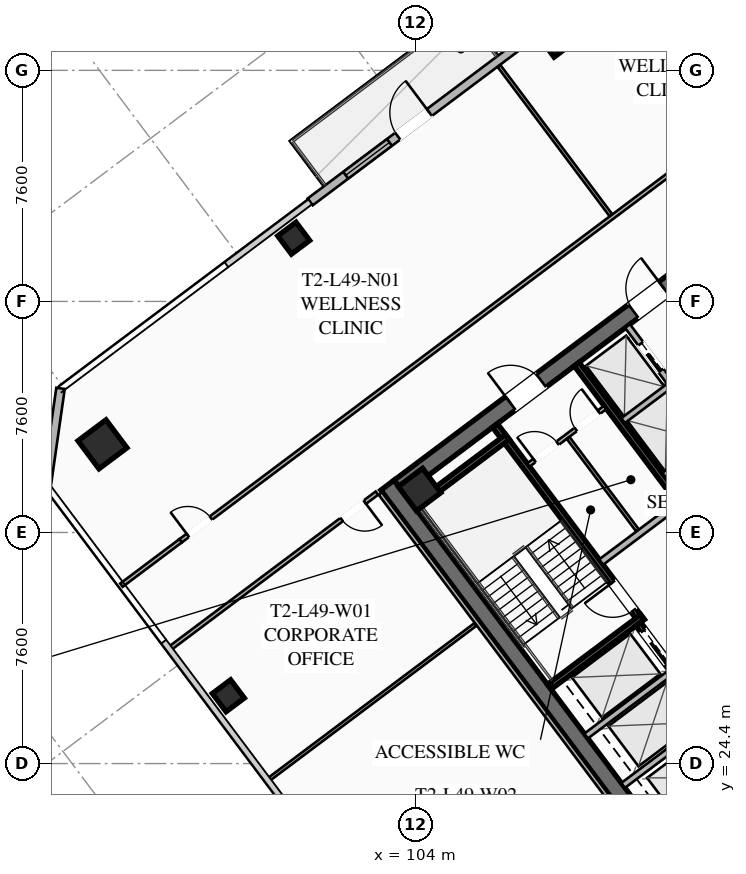
"""IFC4 building model, lengths in metres.
Left out: names, types, materials, properties, quantities, classifications, styles, units other than length and angle.
Written with IfcOpenShell. Run it as: python <this file> out.ifc"""

import sys

from ifc_helpers import new_model, si_unit, direction, frame, frame_2d, origin, origin_2d, place, context, subcontext, project, spatial, rectangle, hollow_rectangle, extrude, element, fill, save


model = new_model("IFC4")
c1 = context("Model", 3, precision=1e-05, world=origin(), true_north=direction((0.0, 1.0)))
c2 = subcontext(c1, "Body", "Model", "MODEL_VIEW")
j1 = project(units=[si_unit("LENGTHUNIT", "METRE"), si_unit("PLANEANGLEUNIT", "RADIAN")], contexts=[c1])
p1 = place(None, origin())
s1 = spatial("IfcSite", under=j1, at=p1, CompositionType="ELEMENT")
p2 = place(p1, origin())
s2 = spatial("IfcBuilding", under=s1, at=p2, CompositionType="ELEMENT")
p3 = place(p2, frame((0.0, 0.0, 181.85)))
s3 = spatial("IfcBuildingStorey", under=s2, at=p3, CompositionType="ELEMENT", Elevation=181.85)
p4 = place(p3, frame((112.436, 21.077, 0.0), z_axis=(0.0, 0.0, 1.0), x_axis=(-0.600005007985, 0.799996243986, 0.0)))
e1 = element("IfcWall", 1, at=p4, inside=s3, PredefinedType="SHEAR", context=c2, shape_type="SweptSolid", body=[
    extrude(rectangle(XDim=15.6, YDim=0.55, at=frame_2d((7.8, 0.0))), origin(), (0.0, 0.0, 1.0), 3.55),
])
p5 = place(p3, frame((103.461, 33.502, 0.0), z_axis=(0.0, 0.0, 1.0), x_axis=(0.799998054672, 0.600002593761, 0.0)))
e2 = element("IfcWall", 2, at=p5, inside=s3, PredefinedType="SHEAR", context=c2, shape_type="SweptSolid", body=[
    extrude(rectangle(XDim=15.06, YDim=0.55, at=frame_2d((7.53, 0.0))), origin(), (0.0, 0.0, 1.0), 3.55),
])
p6 = place(p5, frame((4.58, 0.0, 0.0)))
e3 = element("IfcOpeningElement", 3, at=p6, cuts=e2, PredefinedType="OPENING", context=c2, shape_type="SweptSolid", body=[
    extrude(rectangle(XDim=1.25, YDim=2.25, at=frame_2d((0.625, 1.125))), frame((0.0, 0.285, 0.0), z_axis=(0.0, -1.0, 0.0), x_axis=(1.0, 0.0, 0.0)), (0.0, 0.0, 1.0), 0.57),
])
p7 = place(p5, frame((9.63, 0.0, 0.0)))
e4 = element("IfcOpeningElement", 4, at=p7, cuts=e2, PredefinedType="OPENING", context=c2, shape_type="SweptSolid", body=[
    extrude(rectangle(XDim=1.25, YDim=2.25, at=frame_2d((0.625, 1.125))), frame((0.0, 0.285, 0.0), z_axis=(0.0, -1.0, 0.0), x_axis=(1.0, 0.0, 0.0)), (0.0, 0.0, 1.0), 0.57),
])
p8 = place(p3, frame((104.13, 33.41, 0.0), z_axis=(0.0, 0.0, 1.0), x_axis=(0.799999996291, 0.600000004945, 0.0)))
e5 = element("IfcColumn", 5, at=p8, inside=s3, PredefinedType="COLUMN", context=c2, shape_type="SweptSolid", body=[
    extrude(hollow_rectangle(XDim=1.0, YDim=1.0, WallThickness=0.04, at=origin_2d()), origin(), (0.0, 0.0, 1.0), 3.37),
])
p9 = place(p3, frame((93.7, 34.9, 0.0), z_axis=(0.0, 0.0, 1.0), x_axis=(0.799999996291, 0.600000004945, 0.0)))
e6 = element("IfcColumn", 6, at=p9, inside=s3, PredefinedType="COLUMN", context=c2, shape_type="SweptSolid", body=[
    extrude(hollow_rectangle(XDim=1.15, YDim=1.15, WallThickness=0.045, at=origin_2d()), origin(), (0.0, 0.0, 1.0), 3.37),
])
for number, where, z_axis, x_axis in (
    (7, (108.63, 48.16, 0.0), (0.0, 0.0, 1.0), (0.8, 0.6, 0.0)),
    (8, (99.99, 41.68, 0.0), (0.0, 0.0, 1.0), (0.8, 0.6, 0.0)),
    (9, (97.84, 26.63, 0.0), (0.0, 0.0, 1.0), (0.8, 0.6, 0.0)),
):
    element("IfcColumn", number, at=place(p3, frame(where, z_axis=z_axis, x_axis=x_axis)), inside=s3, PredefinedType="COLUMN", context=c2, shape_type="SweptSolid", body=[
        extrude(hollow_rectangle(XDim=0.75, YDim=0.75, WallThickness=0.032, at=origin_2d()), origin(), (0.0, 0.0, 1.0), 3.37),
    ])
p10 = place(p3, frame((100.532, 42.874, 0.0), z_axis=(0.0, 0.0, 1.0), x_axis=(0.799996553335, 0.600004595526, 0.0)))
e10 = element("IfcWall", 10, at=p10, inside=s3, PredefinedType="SOLIDWALL", context=c2, shape_type="SweptSolid", body=[
    extrude(rectangle(XDim=8.5, YDim=0.28, at=frame_2d((4.25, 0.0))), origin(), (0.0, 0.0, 1.0), 3.37),
])
p11 = place(p10, frame((3.6, 0.0, 0.0)))
e11 = element("IfcOpeningElement", 11, at=p11, cuts=e10, PredefinedType="OPENING", context=c2, shape_type="SweptSolid", body=[
    extrude(rectangle(XDim=1.3, YDim=2.15, at=frame_2d((0.65, 1.075))), frame((0.0, 0.15, 0.0), z_axis=(0.0, -1.0, 0.0), x_axis=(1.0, 0.0, 0.0)), (0.0, 0.0, 1.0), 0.3),
])
p12 = place(p10, frame((1.46, 0.0, 0.85)))
e12 = element("IfcOpeningElement", 12, at=p12, cuts=e10, PredefinedType="OPENING", context=c2, shape_type="SweptSolid", body=[
    extrude(rectangle(XDim=1.8, YDim=1.92, at=frame_2d((0.9, 0.96))), frame((0.0, 0.15, 0.0), z_axis=(0.0, -1.0, 0.0), x_axis=(1.0, 0.0, 0.0)), (0.0, 0.0, 1.0), 0.3),
])
p13 = place(p3, frame((91.86, 33.52, 0.0), z_axis=(0.0, 0.0, 1.0), x_axis=(0.141410847992, 0.989950994782, 0.0)))
e13 = element("IfcWall", 13, at=p13, inside=s3, PredefinedType="SOLIDWALL", context=c2, shape_type="SweptSolid", body=[
    extrude(rectangle(XDim=3.253, YDim=0.28, at=frame_2d((1.626, 0.0))), origin(), (0.0, 0.0, 1.0), 3.37),
])
p14 = place(p3, frame((111.44, 29.08, 0.0), z_axis=(0.0, 0.0, 1.0), x_axis=(-0.59999029481, 0.8000072788, 0.0)))
e14 = element("IfcWall", 14, at=p14, inside=s3, PredefinedType="SHEAR", context=c2, shape_type="SweptSolid", body=[
    extrude(rectangle(XDim=8.05, YDim=0.2, at=frame_2d((4.025, 0.0))), origin(), (0.0, 0.0, 1.0), 3.37),
])
p15 = place(p14, frame((0.45, 0.0, 0.0)))
e15 = element("IfcOpeningElement", 15, at=p15, cuts=e14, PredefinedType="OPENING", context=c2, shape_type="SweptSolid", body=[
    extrude(rectangle(XDim=1.15, YDim=2.2, at=frame_2d((0.575, 1.1))), frame((0.0, 0.11, 0.0), z_axis=(0.0, -1.0, 0.0), x_axis=(1.0, 0.0, 0.0)), (0.0, 0.0, 1.0), 0.22),
])
for number, where, z_axis, x_axis in (
    (16, (108.396, 26.922, 0.0), (0.0, 0.0, 1.0), (0.8, 0.6, 0.0)),
    (17, (103.956, 32.842, 0.0), (0.0, 0.0, 1.0), (0.8, 0.6, 0.0)),
):
    element("IfcWall", number, at=place(p3, frame(where, z_axis=z_axis, x_axis=x_axis)), inside=s3, PredefinedType="SHEAR", context=c2, shape_type="SweptSolid", body=[
        extrude(rectangle(XDim=3.83, YDim=0.2, at=frame_2d((1.915, 0.0))), origin(), (0.0, 0.0, 1.0), 3.37),
    ])
p16 = place(p3, frame((117.998, 25.936, 0.0), z_axis=(0.0, 0.0, 1.0), x_axis=(-0.600002693989, 0.799997979501, 0.0)))
e18 = element("IfcWall", 18, at=p16, inside=s3, PredefinedType="SHEAR", context=c2, shape_type="SweptSolid", body=[
    extrude(rectangle(XDim=14.5, YDim=0.2, at=frame_2d((7.25, 0.0))), origin(), (0.0, 0.0, 1.0), 3.37),
])
p17 = place(p3, frame((110.104, 31.028, 0.0), z_axis=(0.0, 0.0, 1.0), x_axis=(0.800018601094, 0.59997519774, 0.0)))
e19 = element("IfcWall", 19, at=p17, inside=s3, PredefinedType="SOLIDWALL", context=c2, shape_type="SweptSolid", body=[
    extrude(rectangle(XDim=3.15, YDim=0.22, at=frame_2d((1.575, 0.0))), origin(), (0.0, 0.0, 1.0), 2.723),
])
p18 = place(p3, frame((115.19, 23.83, 0.0), z_axis=(0.0, 0.0, 1.0), x_axis=(-0.599993943644, 0.800004542231, 0.0)))
e20 = element("IfcWall", 20, at=p18, inside=s3, PredefinedType="SHEAR", context=c2, shape_type="SweptSolid", body=[
    extrude(rectangle(XDim=6.45, YDim=0.2, at=frame_2d((3.225, 0.0))), origin(), (0.0, 0.0, 1.0), 3.37),
])
p19 = place(p18, frame((4.875, 0.0, 0.0)))
e21 = element("IfcOpeningElement", 21, at=p19, cuts=e20, PredefinedType="OPENING", context=c2, shape_type="SweptSolid", body=[
    extrude(rectangle(XDim=1.3, YDim=2.25, at=frame_2d((0.65, 1.125))), frame((0.0, 0.11, 0.0), z_axis=(0.0, -1.0, 0.0), x_axis=(1.0, 0.0, 0.0)), (0.0, 0.0, 1.0), 0.22),
])
p20 = place(p18, frame((2.875, 0.0, 0.0)))
e22 = element("IfcOpeningElement", 22, at=p20, cuts=e20, PredefinedType="OPENING", context=c2, shape_type="SweptSolid", body=[
    extrude(rectangle(XDim=1.3, YDim=2.25, at=frame_2d((0.65, 1.125))), frame((0.0, 0.11, 0.0), z_axis=(0.0, -1.0, 0.0), x_axis=(1.0, 0.0, 0.0)), (0.0, 0.0, 1.0), 0.22),
])
p21 = place(p18, frame((0.675, 0.0, 0.0)))
e23 = element("IfcOpeningElement", 23, at=p21, cuts=e20, PredefinedType="OPENING", context=c2, shape_type="SweptSolid", body=[
    extrude(rectangle(XDim=1.3, YDim=2.25, at=frame_2d((0.65, 1.125))), frame((0.0, 0.11, 0.0), z_axis=(0.0, -1.0, 0.0), x_axis=(1.0, 0.0, 0.0)), (0.0, 0.0, 1.0), 0.22),
])
for number, where, z_axis, x_axis in (
    (24, (110.826, 23.682, 0.0), (0.0, 0.0, 1.0), (0.8, 0.6, 0.0)),
    (25, (109.608, 25.306, 0.0), (0.0, 0.0, 1.0), (0.8, 0.6, 0.0)),
):
    element("IfcWall", number, at=place(p3, frame(where, z_axis=z_axis, x_axis=x_axis)), inside=s3, PredefinedType="SOLIDWALL", context=c2, shape_type="SweptSolid", body=[
        extrude(rectangle(XDim=3.48, YDim=0.2, at=frame_2d((1.74, 0.0))), origin(), (0.0, 0.0, 1.0), 3.37),
    ])
p22 = place(p3, frame((107.71, 34.22, 0.0), z_axis=(0.0, 0.0, 1.0), x_axis=(0.799981399002, 0.60002480053, 0.0)))
e26 = element("IfcWall", 26, at=p22, inside=s3, PredefinedType="PARTITIONING", context=c2, shape_type="SweptSolid", body=[
    extrude(rectangle(XDim=3.15, YDim=0.135, at=frame_2d((1.575, 0.0))), origin(), (0.0, 0.0, 1.0), 2.723),
])
p23 = place(p22, frame((0.25, 0.0, 0.0)))
e27 = element("IfcOpeningElement", 27, at=p23, cuts=e26, PredefinedType="OPENING", context=c2, shape_type="SweptSolid", body=[
    extrude(rectangle(XDim=0.95, YDim=2.05, at=frame_2d((0.475, 1.025))), frame((0.0, 0.077, 0.0), z_axis=(0.0, -1.0, 0.0), x_axis=(1.0, 0.0, 0.0)), (0.0, 0.0, 1.0), 0.155),
])
p24 = place(p22, frame((1.95, 0.0, 0.0)))
e28 = element("IfcOpeningElement", 28, at=p24, cuts=e26, PredefinedType="OPENING", context=c2, shape_type="SweptSolid", body=[
    extrude(rectangle(XDim=0.95, YDim=2.05, at=frame_2d((0.475, 1.025))), frame((0.0, 0.077, 0.0), z_axis=(0.0, -1.0, 0.0), x_axis=(1.0, 0.0, 0.0)), (0.0, 0.0, 1.0), 0.155),
])
p25 = place(p3, frame((111.296, 32.072, 0.0), z_axis=(0.0, 0.0, 1.0), x_axis=(-0.59995887973, 0.800030838552, 0.0)))
e29 = element("IfcWall", 29, at=p25, inside=s3, PredefinedType="PARTITIONING", context=c2, shape_type="SweptSolid", body=[
    extrude(rectangle(XDim=3.8, YDim=0.11, at=frame_2d((1.9, 0.0))), origin(), (0.0, 0.0, 1.0), 2.723),
])
p26 = place(p3, frame((115.11, 33.27, 0.0), z_axis=(0.0, 0.0, 1.0), x_axis=(-0.600011322243, 0.799991508192, 0.0)))
e30 = element("IfcWall", 30, at=p26, inside=s3, PredefinedType="SOLIDWALL", context=c2, shape_type="SweptSolid", body=[
    extrude(rectangle(XDim=6.9, YDim=0.2, at=frame_2d((3.45, 0.0))), origin(), (0.0, 0.0, 1.0), 3.37),
])
p27 = place(p26, frame((0.575, 0.0, 0.0)))
e31 = element("IfcOpeningElement", 31, at=p27, cuts=e30, PredefinedType="OPENING", context=c2, shape_type="SweptSolid", body=[
    extrude(rectangle(XDim=1.1, YDim=2.2, at=frame_2d((0.55, 1.1))), frame((0.0, 0.11, 0.0), z_axis=(0.0, -1.0, 0.0), x_axis=(1.0, 0.0, 0.0)), (0.0, 0.0, 1.0), 0.22),
])
p28 = place(p26, frame((2.825, 0.0, 0.0)))
e32 = element("IfcOpeningElement", 32, at=p28, cuts=e30, PredefinedType="OPENING", context=c2, shape_type="SweptSolid", body=[
    extrude(rectangle(XDim=1.1, YDim=2.2, at=frame_2d((0.55, 1.1))), frame((0.0, 0.11, 0.0), z_axis=(0.0, -1.0, 0.0), x_axis=(1.0, 0.0, 0.0)), (0.0, 0.0, 1.0), 0.22),
])
p29 = place(p26, frame((5.075, 0.0, 0.0)))
e33 = element("IfcOpeningElement", 33, at=p29, cuts=e30, PredefinedType="OPENING", context=c2, shape_type="SweptSolid", body=[
    extrude(rectangle(XDim=1.1, YDim=2.2, at=frame_2d((0.55, 1.1))), frame((0.0, 0.11, 0.0), z_axis=(0.0, -1.0, 0.0), x_axis=(1.0, 0.0, 0.0)), (0.0, 0.0, 1.0), 0.22),
])
p30 = place(p3, frame((112.176, 33.882, 0.0), z_axis=(0.0, 0.0, 1.0), x_axis=(0.8, 0.6, 0.0)))
e34 = element("IfcWall", 34, at=p30, inside=s3, PredefinedType="SOLIDWALL", context=c2, shape_type="SweptSolid", body=[
    extrude(rectangle(XDim=1.88, YDim=0.2, at=frame_2d((0.94, 0.0))), origin(), (0.0, 0.0, 1.0), 3.37),
])
p31 = place(p3, frame((110.826, 35.682, 0.0), z_axis=(0.0, 0.0, 1.0), x_axis=(0.799984418148, 0.600020775241, 0.0)))
e35 = element("IfcWall", 35, at=p31, inside=s3, PredefinedType="SOLIDWALL", context=c2, shape_type="SweptSolid", body=[
    extrude(rectangle(XDim=1.88, YDim=0.2, at=frame_2d((0.94, 0.0))), origin(), (0.0, 0.0, 1.0), 3.37),
])
p32 = place(p3, frame((96.268, 31.726, 0.0), z_axis=(0.0, 0.0, 1.0), x_axis=(0.8, 0.6, 0.0)))
e36 = element("IfcWall", 36, at=p32, inside=s3, PredefinedType="PARTITIONING", context=c2, shape_type="SweptSolid", body=[
    extrude(rectangle(XDim=28.7, YDim=0.135, at=frame_2d((14.35, 0.0))), origin(), (0.0, 0.0, 1.0), 2.723),
])
p33 = place(p32, frame((0.3, 0.0, 0.0)))
e37 = element("IfcOpeningElement", 37, at=p33, cuts=e36, PredefinedType="OPENING", context=c2, shape_type="SweptSolid", body=[
    extrude(rectangle(XDim=0.95, YDim=2.05, at=frame_2d((0.475, 1.025))), frame((0.0, 0.077, 0.0), z_axis=(0.0, -1.0, 0.0), x_axis=(1.0, 0.0, 0.0)), (0.0, 0.0, 1.0), 0.155),
])
p34 = place(p32, frame((27.45, 0.0, 0.0)))
e38 = element("IfcOpeningElement", 38, at=p34, cuts=e36, PredefinedType="OPENING", context=c2, shape_type="SweptSolid", body=[
    extrude(rectangle(XDim=0.95, YDim=2.05, at=frame_2d((0.475, 1.025))), frame((0.0, 0.077, 0.0), z_axis=(0.0, -1.0, 0.0), x_axis=(1.0, 0.0, 0.0)), (0.0, 0.0, 1.0), 0.155),
])
p35 = place(p3, frame((94.324, 30.268, 0.0), z_axis=(0.0, 0.0, 1.0), x_axis=(0.800012055778, 0.599983925293, 0.0)))
e39 = element("IfcWall", 39, at=p35, inside=s3, PredefinedType="PARTITIONING", context=c2, shape_type="SweptSolid", body=[
    extrude(rectangle(XDim=2.43, YDim=0.135, at=frame_2d((1.215, 0.0))), origin(), (0.0, 0.0, 1.0), 2.723),
])
p36 = place(p3, frame((110.42, 42.44, 0.0), z_axis=(0.0, 0.0, 1.0), x_axis=(-0.599993627662, 0.800004779214, 0.0)))
e40 = element("IfcWall", 40, at=p36, inside=s3, PredefinedType="PARTITIONING", context=c2, shape_type="SweptSolid", body=[
    extrude(rectangle(XDim=6.13, YDim=0.11, at=frame_2d((3.065, 0.0))), origin(), (0.0, 0.0, 1.0), 2.723),
])
p37 = place(p3, frame((131.09, 33.13, 0.0), z_axis=(0.0, 0.0, 1.0), x_axis=(-0.800003062365, -0.599995916825, 0.0)))
e41 = element("IfcWall", 41, at=p37, inside=s3, PredefinedType="PARTITIONING", context=c2, shape_type="SweptSolid", body=[
    extrude(rectangle(XDim=28.7, YDim=0.135, at=frame_2d((14.35, 0.0))), origin(), (0.0, 0.0, 1.0), 2.723),
])
p38 = place(p37, frame((27.37, 0.0, 0.0)))
e42 = element("IfcOpeningElement", 42, at=p38, cuts=e41, PredefinedType="OPENING", context=c2, shape_type="SweptSolid", body=[
    extrude(rectangle(XDim=0.95, YDim=2.05, at=frame_2d((0.475, 1.025))), frame((0.0, 0.077, 0.0), z_axis=(0.0, -1.0, 0.0), x_axis=(1.0, 0.0, 0.0)), (0.0, 0.0, 1.0), 0.155),
])
p39 = place(p37, frame((0.38, 0.0, 0.0)))
e43 = element("IfcOpeningElement", 43, at=p39, cuts=e41, PredefinedType="OPENING", context=c2, shape_type="SweptSolid", body=[
    extrude(rectangle(XDim=0.95, YDim=2.05, at=frame_2d((0.475, 1.025))), frame((0.0, 0.077, 0.0), z_axis=(0.0, -1.0, 0.0), x_axis=(1.0, 0.0, 0.0)), (0.0, 0.0, 1.0), 0.155),
])
p40 = place(p3, frame((112.104, 20.928, 0.0), z_axis=(0.0, 0.0, 1.0), x_axis=(-0.599994940075, 0.800003794918, 0.0)))
e44 = element("IfcWall", 44, at=p40, inside=s3, PredefinedType="PARTITIONING", context=c2, shape_type="SweptSolid", body=[
    extrude(rectangle(XDim=15.44, YDim=0.135, at=frame_2d((7.72, 0.0))), origin(), (0.0, 0.0, 1.0), 2.723),
])
p41 = place(p3, frame((102.728, 33.296, 0.0), z_axis=(0.0, 0.0, 1.0), x_axis=(-0.800013722153, -0.59998170336, 0.0)))
e45 = element("IfcWall", 45, at=p41, inside=s3, PredefinedType="PARTITIONING", context=c2, shape_type="SweptSolid", body=[
    extrude(rectangle(XDim=8.54, YDim=0.135, at=frame_2d((4.27, 0.0))), origin(), (0.0, 0.0, 1.0), 2.723),
])
p42 = place(p41, frame((0.5, 0.0, 0.0)))
e46 = element("IfcOpeningElement", 46, at=p42, cuts=e45, PredefinedType="OPENING", context=c2, shape_type="SweptSolid", body=[
    extrude(rectangle(XDim=0.95, YDim=2.05, at=frame_2d((0.475, 1.025))), frame((0.0, 0.077, 0.0), z_axis=(0.0, -1.0, 0.0), x_axis=(1.0, 0.0, 0.0)), (0.0, 0.0, 1.0), 0.155),
])
p43 = place(p3, frame((99.136, 23.852, 0.0), z_axis=(0.0, 0.0, 1.0), x_axis=(0.8, 0.6, 0.0)))
e47 = element("IfcWall", 47, at=p43, inside=s3, PredefinedType="PARTITIONING", context=c2, shape_type="SweptSolid", body=[
    extrude(rectangle(XDim=8.54, YDim=0.11, at=frame_2d((4.27, 0.0))), origin(), (0.0, 0.0, 1.0), 2.723),
])
p44 = place(p11, origin())
e48 = element("IfcDoor", 48, at=p44, inside=s3, OperationType="SINGLE_SWING_RIGHT", PredefinedType="DOOR", context=c2, shape_type="SweptSolid", body=[
    extrude(rectangle(XDim=1.3, YDim=2.15, at=frame_2d((0.65, 1.075))), frame((0.0, 0.025, 0.0), z_axis=(0.0, -1.0, 0.0), x_axis=(1.0, 0.0, 0.0)), (0.0, 0.0, 1.0), 0.05),
])
fill(e11, e48)
p45 = place(p12, origin())
e49 = element("IfcWindow", 49, at=p45, inside=s3, PartitioningType="SINGLE_PANEL", PredefinedType="WINDOW", context=c2, shape_type="SweptSolid", body=[
    extrude(rectangle(XDim=1.8, YDim=1.92, at=frame_2d((0.9, 0.96))), frame((0.0, 0.03, 0.0), z_axis=(0.0, -1.0, 0.0), x_axis=(1.0, 0.0, 0.0)), (0.0, 0.0, 1.0), 0.06),
])
fill(e12, e49)
p46 = place(p6, origin())
e50 = element("IfcDoor", 50, at=p46, inside=s3, OperationType="SINGLE_SWING_LEFT", PredefinedType="DOOR", context=c2, shape_type="SweptSolid", body=[
    extrude(rectangle(XDim=1.25, YDim=2.25, at=frame_2d((0.625, 1.125))), frame((0.0, 0.025, 0.0), z_axis=(0.0, -1.0, 0.0), x_axis=(1.0, 0.0, 0.0)), (0.0, 0.0, 1.0), 0.05),
])
fill(e3, e50)
p47 = place(p7, origin())
e51 = element("IfcDoor", 51, at=p47, inside=s3, OperationType="SINGLE_SWING_RIGHT", PredefinedType="DOOR", context=c2, shape_type="SweptSolid", body=[
    extrude(rectangle(XDim=1.25, YDim=2.25, at=frame_2d((0.625, 1.125))), frame((0.0, 0.025, 0.0), z_axis=(0.0, -1.0, 0.0), x_axis=(1.0, 0.0, 0.0)), (0.0, 0.0, 1.0), 0.05),
])
fill(e4, e51)
p48 = place(p15, origin())
e52 = element("IfcDoor", 52, at=p48, inside=s3, OperationType="SINGLE_SWING_RIGHT", PredefinedType="DOOR", context=c2, shape_type="SweptSolid", body=[
    extrude(rectangle(XDim=1.15, YDim=2.2, at=frame_2d((0.575, 1.1))), frame((0.0, 0.025, 0.0), z_axis=(0.0, -1.0, 0.0), x_axis=(1.0, 0.0, 0.0)), (0.0, 0.0, 1.0), 0.05),
])
fill(e15, e52)
p49 = place(p23, origin())
e53 = element("IfcDoor", 53, at=p49, inside=s3, OperationType="SINGLE_SWING_LEFT", PredefinedType="DOOR", context=c2, shape_type="SweptSolid", body=[
    extrude(rectangle(XDim=0.95, YDim=2.05, at=frame_2d((0.475, 1.025))), frame((0.0, 0.025, 0.0), z_axis=(0.0, -1.0, 0.0), x_axis=(1.0, 0.0, 0.0)), (0.0, 0.0, 1.0), 0.05),
])
fill(e27, e53)
p50 = place(p24, origin())
e54 = element("IfcDoor", 54, at=p50, inside=s3, OperationType="SINGLE_SWING_RIGHT", PredefinedType="DOOR", context=c2, shape_type="SweptSolid", body=[
    extrude(rectangle(XDim=0.95, YDim=2.05, at=frame_2d((0.475, 1.025))), frame((0.0, 0.025, 0.0), z_axis=(0.0, -1.0, 0.0), x_axis=(1.0, 0.0, 0.0)), (0.0, 0.0, 1.0), 0.05),
])
fill(e28, e54)
p51 = place(p33, origin())
e55 = element("IfcDoor", 55, at=p51, inside=s3, OperationType="SINGLE_SWING_LEFT", PredefinedType="DOOR", context=c2, shape_type="SweptSolid", body=[
    extrude(rectangle(XDim=0.95, YDim=2.05, at=frame_2d((0.475, 1.025))), frame((0.0, 0.025, 0.0), z_axis=(0.0, -1.0, 0.0), x_axis=(1.0, 0.0, 0.0)), (0.0, 0.0, 1.0), 0.05),
])
fill(e37, e55)
p52 = place(p42, origin())
e56 = element("IfcDoor", 56, at=p52, inside=s3, OperationType="SINGLE_SWING_LEFT", PredefinedType="DOOR", context=c2, shape_type="SweptSolid", body=[
    extrude(rectangle(XDim=0.95, YDim=2.05, at=frame_2d((0.475, 1.025))), frame((0.0, 0.025, 0.0), z_axis=(0.0, -1.0, 0.0), x_axis=(1.0, 0.0, 0.0)), (0.0, 0.0, 1.0), 0.05),
])
fill(e46, e56)
p53 = place(p19, origin())
e57 = element("IfcDoor", 57, at=p53, inside=s3, OperationType="SLIDING_TO_LEFT", PredefinedType="DOOR", context=c2, shape_type="SweptSolid", body=[
    extrude(rectangle(XDim=1.3, YDim=2.25, at=frame_2d((0.65, 1.125))), frame((0.0, 0.025, 0.0), z_axis=(0.0, -1.0, 0.0), x_axis=(1.0, 0.0, 0.0)), (0.0, 0.0, 1.0), 0.05),
])
fill(e21, e57)
p54 = place(p29, origin())
e58 = element("IfcDoor", 58, at=p54, inside=s3, OperationType="SLIDING_TO_LEFT", PredefinedType="DOOR", context=c2, shape_type="SweptSolid", body=[
    extrude(rectangle(XDim=1.1, YDim=2.2, at=frame_2d((0.55, 1.1))), frame((0.0, 0.025, 0.0), z_axis=(0.0, -1.0, 0.0), x_axis=(1.0, 0.0, 0.0)), (0.0, 0.0, 1.0), 0.05),
])
fill(e33, e58)
save(model, sys.argv[1])
